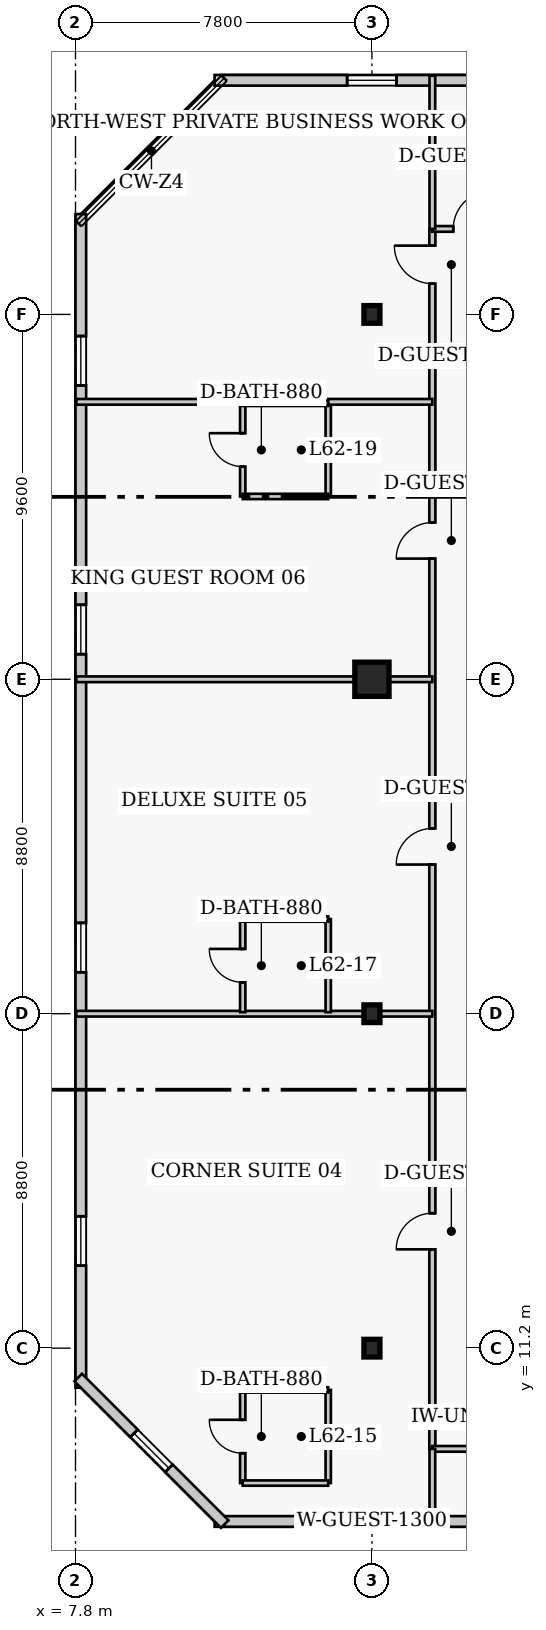
"""IFC4 building model, lengths in metres.
Left out: names, types, materials, properties, quantities, classifications, styles, units other than length and angle.
Written with IfcOpenShell. Run it as: python <this file> out.ifc"""

import sys

from ifc_helpers import new_model, si_unit, direction, frame, frame_2d, origin, origin_2d, place, context, subcontext, project, spatial, rectangle, i_section, extrude, element, fill, save


model = new_model("IFC4")
c1 = context("Model", 3, precision=1e-05, world=origin(), true_north=direction((0.0, 1.0)))
c2 = subcontext(c1, "Body", "Model", "MODEL_VIEW")
j1 = project(units=[si_unit("LENGTHUNIT", "METRE"), si_unit("PLANEANGLEUNIT", "RADIAN")], contexts=[c1])
p1 = place(None, origin())
s1 = spatial("IfcSite", under=j1, at=p1, CompositionType="ELEMENT")
p2 = place(p1, origin())
s2 = spatial("IfcBuilding", under=s1, at=p2, CompositionType="ELEMENT")
p3 = place(p2, frame((0.0, 0.0, 249.4)))
s3 = spatial("IfcBuildingStorey", under=s2, at=p3, CompositionType="ELEMENT", Elevation=249.4)
for number, where, z_axis, x_axis in (
    (1, (15.6, 11.2, 0.0), (0.0, 0.0, 1.0), (1.0, 0.0, 0.0)),
    (2, (15.6, 20.0, 0.0), (0.0, 0.0, 1.0), (1.0, 0.0, 0.0)),
):
    element("IfcColumn", number, at=place(p3, frame(where, z_axis=z_axis, x_axis=x_axis)), inside=s3, PredefinedType="COLUMN", context=c2, shape_type="SweptSolid", body=[
        extrude(i_section(OverallWidth=0.422, OverallDepth=0.465, WebThickness=0.045, FlangeThickness=0.073, FilletRadius=0.017, at=origin_2d()), origin(), (0.0, 0.0, 1.0), 4.0),
    ])
p4 = place(p3, frame((15.6, 28.8, 0.0), z_axis=(0.0, 0.0, 1.0), x_axis=(1.0, 0.0, 0.0)))
e3 = element("IfcColumn", 3, at=p4, inside=s3, PredefinedType="COLUMN", context=c2, shape_type="SweptSolid", body=[
    extrude(rectangle(XDim=0.9, YDim=0.9, at=origin_2d()), origin(), (0.0, 0.0, 1.0), 4.0),
])
p5 = place(p3, frame((15.6, 38.4, 0.0), z_axis=(0.0, 0.0, 1.0), x_axis=(1.0, 0.0, 0.0)))
e4 = element("IfcColumn", 4, at=p5, inside=s3, PredefinedType="COLUMN", context=c2, shape_type="SweptSolid", body=[
    extrude(i_section(OverallWidth=0.422, OverallDepth=0.465, WebThickness=0.045, FlangeThickness=0.073, FilletRadius=0.017, at=origin_2d()), origin(), (0.0, 0.0, 1.0), 4.0),
])
p6 = place(p3, frame((11.46, 6.64, 0.0), z_axis=(0.0, 0.0, 1.0), x_axis=(1.0, 0.0, 0.0)))
e5 = element("IfcWall", 5, at=p6, inside=s3, PredefinedType="SOLIDWALL", context=c2, shape_type="SweptSolid", body=[
    extrude(rectangle(XDim=24.83, YDim=0.28, at=frame_2d((12.415, 0.0))), origin(), (0.0, 0.0, 1.0), 3.76),
])
p7 = place(p6, frame((3.488, 0.0, 0.85)))
e6 = element("IfcOpeningElement", 6, at=p7, cuts=e5, PredefinedType="OPENING", context=c2, shape_type="SweptSolid", body=[
    extrude(rectangle(XDim=1.3, YDim=1.7, at=frame_2d((0.65, 0.85))), frame((0.0, 0.15, 0.0), z_axis=(0.0, -1.0, 0.0), x_axis=(1.0, 0.0, 0.0)), (0.0, 0.0, 1.0), 0.3),
])
p8 = place(p6, frame((12.915, 0.0, 0.85)))
e7 = element("IfcOpeningElement", 7, at=p8, cuts=e5, PredefinedType="OPENING", context=c2, shape_type="SweptSolid", body=[
    extrude(rectangle(XDim=1.3, YDim=1.7, at=frame_2d((0.65, 0.85))), frame((0.0, 0.15, 0.0), z_axis=(0.0, -1.0, 0.0), x_axis=(1.0, 0.0, 0.0)), (0.0, 0.0, 1.0), 0.3),
])
p9 = place(p6, frame((20.692, 0.0, 0.85)))
e8 = element("IfcOpeningElement", 8, at=p9, cuts=e5, PredefinedType="OPENING", context=c2, shape_type="SweptSolid", body=[
    extrude(rectangle(XDim=1.3, YDim=1.7, at=frame_2d((0.65, 0.85))), frame((0.0, 0.15, 0.0), z_axis=(0.0, -1.0, 0.0), x_axis=(1.0, 0.0, 0.0)), (0.0, 0.0, 1.0), 0.3),
])
p10 = place(p3, frame((36.29, 44.56, 0.0), z_axis=(0.0, 0.0, 1.0), x_axis=(-1.0, 0.0, 0.0)))
e9 = element("IfcWall", 9, at=p10, inside=s3, PredefinedType="SOLIDWALL", context=c2, shape_type="SweptSolid", body=[
    extrude(rectangle(XDim=24.83, YDim=0.28, at=frame_2d((12.415, 0.0))), origin(), (0.0, 0.0, 1.0), 3.76),
])
p11 = place(p10, frame((3.488, 0.0, 0.85)))
e10 = element("IfcOpeningElement", 10, at=p11, cuts=e9, PredefinedType="OPENING", context=c2, shape_type="SweptSolid", body=[
    extrude(rectangle(XDim=1.3, YDim=1.7, at=frame_2d((0.65, 0.85))), frame((0.0, 0.15, 0.0), z_axis=(0.0, -1.0, 0.0), x_axis=(1.0, 0.0, 0.0)), (0.0, 0.0, 1.0), 0.3),
])
p12 = place(p10, frame((11.765, 0.0, 0.85)))
e11 = element("IfcOpeningElement", 11, at=p12, cuts=e9, PredefinedType="OPENING", context=c2, shape_type="SweptSolid", body=[
    extrude(rectangle(XDim=1.3, YDim=1.7, at=frame_2d((0.65, 0.85))), frame((0.0, 0.15, 0.0), z_axis=(0.0, -1.0, 0.0), x_axis=(1.0, 0.0, 0.0)), (0.0, 0.0, 1.0), 0.3),
])
p13 = place(p10, frame((20.042, 0.0, 0.85)))
e12 = element("IfcOpeningElement", 12, at=p13, cuts=e9, PredefinedType="OPENING", context=c2, shape_type="SweptSolid", body=[
    extrude(rectangle(XDim=1.3, YDim=1.7, at=frame_2d((0.65, 0.85))), frame((0.0, 0.15, 0.0), z_axis=(0.0, -1.0, 0.0), x_axis=(1.0, 0.0, 0.0)), (0.0, 0.0, 1.0), 0.3),
])
p14 = place(p3, frame((7.94, 41.04, 0.0), z_axis=(0.0, 0.0, 1.0), x_axis=(0.0, -1.0, 0.0)))
e13 = element("IfcWall", 13, at=p14, inside=s3, PredefinedType="SOLIDWALL", context=c2, shape_type="SweptSolid", body=[
    extrude(rectangle(XDim=30.88, YDim=0.28, at=frame_2d((15.44, 0.0))), origin(), (0.0, 0.0, 1.0), 3.76),
])
p15 = place(p14, frame((3.21, 0.0, 0.85)))
e14 = element("IfcOpeningElement", 14, at=p15, cuts=e13, PredefinedType="OPENING", context=c2, shape_type="SweptSolid", body=[
    extrude(rectangle(XDim=1.3, YDim=1.7, at=frame_2d((0.65, 0.85))), frame((0.0, 0.15, 0.0), z_axis=(0.0, -1.0, 0.0), x_axis=(1.0, 0.0, 0.0)), (0.0, 0.0, 1.0), 0.3),
])
p16 = place(p14, frame((10.28, 0.0, 0.85)))
e15 = element("IfcOpeningElement", 15, at=p16, cuts=e13, PredefinedType="OPENING", context=c2, shape_type="SweptSolid", body=[
    extrude(rectangle(XDim=1.3, YDim=1.7, at=frame_2d((0.65, 0.85))), frame((0.0, 0.15, 0.0), z_axis=(0.0, -1.0, 0.0), x_axis=(1.0, 0.0, 0.0)), (0.0, 0.0, 1.0), 0.3),
])
p17 = place(p14, frame((18.65, 0.0, 0.85)))
e16 = element("IfcOpeningElement", 16, at=p17, cuts=e13, PredefinedType="OPENING", context=c2, shape_type="SweptSolid", body=[
    extrude(rectangle(XDim=1.3, YDim=1.7, at=frame_2d((0.65, 0.85))), frame((0.0, 0.15, 0.0), z_axis=(0.0, -1.0, 0.0), x_axis=(1.0, 0.0, 0.0)), (0.0, 0.0, 1.0), 0.3),
])
p18 = place(p14, frame((26.37, 0.0, 0.85)))
e17 = element("IfcOpeningElement", 17, at=p18, cuts=e13, PredefinedType="OPENING", context=c2, shape_type="SweptSolid", body=[
    extrude(rectangle(XDim=1.3, YDim=1.7, at=frame_2d((0.65, 0.85))), frame((0.0, 0.15, 0.0), z_axis=(0.0, -1.0, 0.0), x_axis=(1.0, 0.0, 0.0)), (0.0, 0.0, 1.0), 0.3),
])
p19 = place(p3, frame((7.871, 10.427, 0.0), z_axis=(0.0, 0.0, 1.0), x_axis=(0.707129162587, -0.707084399077, 0.0)))
e18 = element("IfcWall", 18, at=p19, inside=s3, PredefinedType="SOLIDWALL", context=c2, shape_type="SweptSolid", body=[
    extrude(rectangle(XDim=5.454, YDim=0.28, at=frame_2d((2.727, 0.0))), origin(), (0.0, 0.0, 1.0), 3.76),
])
p20 = place(p19, frame((2.077, 0.0, 0.85)))
e19 = element("IfcOpeningElement", 19, at=p20, cuts=e18, PredefinedType="OPENING", context=c2, shape_type="SweptSolid", body=[
    extrude(rectangle(XDim=1.3, YDim=1.7, at=frame_2d((0.65, 0.85))), frame((0.0, 0.15, 0.0), z_axis=(0.0, -1.0, 0.0), x_axis=(1.0, 0.0, 0.0)), (0.0, 0.0, 1.0), 0.3),
])
p21 = place(p3, frame((17.19, 8.55, 0.0), z_axis=(0.0, 0.0, 1.0), x_axis=(0.0, 1.0, 0.0)))
e20 = element("IfcWall", 20, at=p21, inside=s3, PredefinedType="PARTITIONING", context=c2, shape_type="SweptSolid", body=[
    extrude(rectangle(XDim=32.1, YDim=0.16, at=frame_2d((16.05, 0.0))), origin(), (0.0, 0.0, 1.0), 3.76),
])
p22 = place(p21, frame((5.25, 0.0, 0.0)))
e21 = element("IfcOpeningElement", 21, at=p22, cuts=e20, PredefinedType="OPENING", context=c2, shape_type="SweptSolid", body=[
    extrude(rectangle(XDim=0.95, YDim=2.1, at=frame_2d((0.475, 1.05))), frame((0.0, 0.09, 0.0), z_axis=(0.0, -1.0, 0.0), x_axis=(1.0, 0.0, 0.0)), (0.0, 0.0, 1.0), 0.18),
])
p23 = place(p21, frame((15.375, 0.0, 0.0)))
e22 = element("IfcOpeningElement", 22, at=p23, cuts=e20, PredefinedType="OPENING", context=c2, shape_type="SweptSolid", body=[
    extrude(rectangle(XDim=0.95, YDim=2.1, at=frame_2d((0.475, 1.05))), frame((0.0, 0.09, 0.0), z_axis=(0.0, -1.0, 0.0), x_axis=(1.0, 0.0, 0.0)), (0.0, 0.0, 1.0), 0.18),
])
p24 = place(p21, frame((23.425, 0.0, 0.0)))
e23 = element("IfcOpeningElement", 23, at=p24, cuts=e20, PredefinedType="OPENING", context=c2, shape_type="SweptSolid", body=[
    extrude(rectangle(XDim=0.95, YDim=2.1, at=frame_2d((0.475, 1.05))), frame((0.0, 0.09, 0.0), z_axis=(0.0, -1.0, 0.0), x_axis=(1.0, 0.0, 0.0)), (0.0, 0.0, 1.0), 0.18),
])
p25 = place(p21, frame((30.66, 0.0, 0.0)))
e24 = element("IfcOpeningElement", 24, at=p25, cuts=e20, PredefinedType="OPENING", context=c2, shape_type="SweptSolid", body=[
    extrude(rectangle(XDim=1.0, YDim=2.15, at=frame_2d((0.5, 1.075))), frame((0.0, 0.09, 0.0), z_axis=(0.0, -1.0, 0.0), x_axis=(1.0, 0.0, 0.0)), (0.0, 0.0, 1.0), 0.18),
])
p26 = place(p3, frame((17.19, 8.55, 0.0), z_axis=(0.0, 0.0, 1.0), x_axis=(1.0, 0.0, 0.0)))
e25 = element("IfcWall", 25, at=p26, inside=s3, PredefinedType="PARTITIONING", context=c2, shape_type="SweptSolid", body=[
    extrude(rectangle(XDim=2.22, YDim=0.15, at=frame_2d((1.11, 0.0))), origin(), (0.0, 0.0, 1.0), 3.76),
])
p27 = place(p3, frame((17.19, 40.65, 0.0), z_axis=(0.0, 0.0, 1.0), x_axis=(1.0, 0.0, 0.0)))
e26 = element("IfcWall", 26, at=p27, inside=s3, PredefinedType="PARTITIONING", context=c2, shape_type="SweptSolid", body=[
    extrude(rectangle(XDim=4.91, YDim=0.15, at=frame_2d((2.455, 0.0))), origin(), (0.0, 0.0, 1.0), 3.76),
])
p28 = place(p27, frame((0.55, 0.0, 0.0)))
e27 = element("IfcOpeningElement", 27, at=p28, cuts=e26, PredefinedType="OPENING", context=c2, shape_type="SweptSolid", body=[
    extrude(rectangle(XDim=1.0, YDim=2.15, at=frame_2d((0.5, 1.075))), frame((0.0, 0.085, 0.0), z_axis=(0.0, -1.0, 0.0), x_axis=(1.0, 0.0, 0.0)), (0.0, 0.0, 1.0), 0.17),
])
p29 = place(p3, frame((17.19, 40.65, 0.0), z_axis=(0.0, 0.0, 1.0), x_axis=(0.0, 1.0, 0.0)))
e28 = element("IfcWall", 28, at=p29, inside=s3, PredefinedType="PARTITIONING", context=c2, shape_type="SweptSolid", body=[
    extrude(rectangle(XDim=4.03, YDim=0.15, at=frame_2d((2.015, 0.0))), origin(), (0.0, 0.0, 1.0), 3.76),
])
p30 = place(p3, frame((17.19, 6.52, 0.0), z_axis=(0.0, 0.0, 1.0), x_axis=(0.0, 1.0, 0.0)))
e29 = element("IfcWall", 29, at=p30, inside=s3, PredefinedType="PARTITIONING", context=c2, shape_type="SweptSolid", body=[
    extrude(rectangle(XDim=2.03, YDim=0.15, at=frame_2d((1.015, 0.0))), origin(), (0.0, 0.0, 1.0), 3.76),
])
p31 = place(p3, frame((12.2, 7.65, 0.0), z_axis=(0.0, 0.0, 1.0), x_axis=(0.0, 1.0, 0.0)))
e30 = element("IfcWall", 30, at=p31, inside=s3, PredefinedType="PLUMBINGWALL", context=c2, shape_type="SweptSolid", body=[
    extrude(rectangle(XDim=2.45, YDim=0.14, at=frame_2d((1.225, 0.0))), origin(), (0.0, 0.0, 1.0), 3.76),
])
p32 = place(p31, frame((0.785, 0.0, 0.0)))
e31 = element("IfcOpeningElement", 31, at=p32, cuts=e30, PredefinedType="OPENING", context=c2, shape_type="SweptSolid", body=[
    extrude(rectangle(XDim=0.88, YDim=2.05, at=frame_2d((0.44, 1.025))), frame((0.0, 0.08, 0.0), z_axis=(0.0, -1.0, 0.0), x_axis=(1.0, 0.0, 0.0)), (0.0, 0.0, 1.0), 0.16),
])
p33 = place(p3, frame((14.45, 7.65, 0.0), z_axis=(0.0, 0.0, 1.0), x_axis=(0.0, 1.0, 0.0)))
e32 = element("IfcWall", 32, at=p33, inside=s3, PredefinedType="PLUMBINGWALL", context=c2, shape_type="SweptSolid", body=[
    extrude(rectangle(XDim=2.45, YDim=0.14, at=frame_2d((1.225, 0.0))), origin(), (0.0, 0.0, 1.0), 3.76),
])
for number, where, z_axis, x_axis in (
    (33, (12.2, 7.65, 0.0), (0.0, 0.0, 1.0), (1.0, 0.0, 0.0)),
    (34, (12.2, 10.1, 0.0), (0.0, 0.0, 1.0), (1.0, 0.0, 0.0)),
):
    element("IfcWall", number, at=place(p3, frame(where, z_axis=z_axis, x_axis=x_axis)), inside=s3, PredefinedType="PLUMBINGWALL", context=c2, shape_type="SweptSolid", body=[
        extrude(rectangle(XDim=2.25, YDim=0.14, at=frame_2d((1.125, 0.0))), origin(), (0.0, 0.0, 1.0), 3.76),
    ])
p34 = place(p3, frame((7.82, 20.0, 0.0), z_axis=(0.0, 0.0, 1.0), x_axis=(1.0, 0.0, 0.0)))
e35 = element("IfcWall", 35, at=p34, inside=s3, PredefinedType="PARTITIONING", context=c2, shape_type="SweptSolid", body=[
    extrude(rectangle(XDim=9.37, YDim=0.15, at=frame_2d((4.685, 0.0))), origin(), (0.0, 0.0, 1.0), 3.064),
])
p35 = place(p3, frame((12.2, 20.04, 0.0), z_axis=(0.0, 0.0, 1.0), x_axis=(0.0, 1.0, 0.0)))
e36 = element("IfcWall", 36, at=p35, inside=s3, PredefinedType="PLUMBINGWALL", context=c2, shape_type="SweptSolid", body=[
    extrude(rectangle(XDim=2.45, YDim=0.14, at=frame_2d((1.225, 0.0))), origin(), (0.0, 0.0, 1.0), 3.76),
])
p36 = place(p35, frame((0.785, 0.0, 0.0)))
e37 = element("IfcOpeningElement", 37, at=p36, cuts=e36, PredefinedType="OPENING", context=c2, shape_type="SweptSolid", body=[
    extrude(rectangle(XDim=0.88, YDim=2.05, at=frame_2d((0.44, 1.025))), frame((0.0, 0.08, 0.0), z_axis=(0.0, -1.0, 0.0), x_axis=(1.0, 0.0, 0.0)), (0.0, 0.0, 1.0), 0.16),
])
p37 = place(p3, frame((14.45, 20.04, 0.0), z_axis=(0.0, 0.0, 1.0), x_axis=(0.0, 1.0, 0.0)))
e38 = element("IfcWall", 38, at=p37, inside=s3, PredefinedType="PLUMBINGWALL", context=c2, shape_type="SweptSolid", body=[
    extrude(rectangle(XDim=2.45, YDim=0.14, at=frame_2d((1.225, 0.0))), origin(), (0.0, 0.0, 1.0), 3.76),
])
p38 = place(p3, frame((12.2, 22.49, 0.0), z_axis=(0.0, 0.0, 1.0), x_axis=(1.0, 0.0, 0.0)))
e39 = element("IfcWall", 39, at=p38, inside=s3, PredefinedType="PLUMBINGWALL", context=c2, shape_type="SweptSolid", body=[
    extrude(rectangle(XDim=2.25, YDim=0.14, at=frame_2d((1.125, 0.0))), origin(), (0.0, 0.0, 1.0), 3.76),
])
p39 = place(p3, frame((7.82, 28.8, 0.0), z_axis=(0.0, 0.0, 1.0), x_axis=(1.0, 0.0, 0.0)))
e40 = element("IfcWall", 40, at=p39, inside=s3, PredefinedType="PARTITIONING", context=c2, shape_type="SweptSolid", body=[
    extrude(rectangle(XDim=9.37, YDim=0.15, at=frame_2d((4.685, 0.0))), origin(), (0.0, 0.0, 1.0), 3.064),
])
p40 = place(p3, frame((12.2, 33.61, 0.0), z_axis=(0.0, 0.0, 1.0), x_axis=(0.0, 1.0, 0.0)))
e41 = element("IfcWall", 41, at=p40, inside=s3, PredefinedType="PLUMBINGWALL", context=c2, shape_type="SweptSolid", body=[
    extrude(rectangle(XDim=2.45, YDim=0.14, at=frame_2d((1.225, 0.0))), origin(), (0.0, 0.0, 1.0), 3.76),
])
p41 = place(p40, frame((0.785, 0.0, 0.0)))
e42 = element("IfcOpeningElement", 42, at=p41, cuts=e41, PredefinedType="OPENING", context=c2, shape_type="SweptSolid", body=[
    extrude(rectangle(XDim=0.88, YDim=2.05, at=frame_2d((0.44, 1.025))), frame((0.0, 0.08, 0.0), z_axis=(0.0, -1.0, 0.0), x_axis=(1.0, 0.0, 0.0)), (0.0, 0.0, 1.0), 0.16),
])
p42 = place(p3, frame((14.45, 33.61, 0.0), z_axis=(0.0, 0.0, 1.0), x_axis=(0.0, 1.0, 0.0)))
e43 = element("IfcWall", 43, at=p42, inside=s3, PredefinedType="PLUMBINGWALL", context=c2, shape_type="SweptSolid", body=[
    extrude(rectangle(XDim=2.45, YDim=0.14, at=frame_2d((1.225, 0.0))), origin(), (0.0, 0.0, 1.0), 3.76),
])
for number, where, z_axis, x_axis in (
    (44, (12.2, 33.61, 0.0), (0.0, 0.0, 1.0), (1.0, 0.0, 0.0)),
    (45, (12.2, 36.06, 0.0), (0.0, 0.0, 1.0), (1.0, 0.0, 0.0)),
):
    element("IfcWall", number, at=place(p3, frame(where, z_axis=z_axis, x_axis=x_axis)), inside=s3, PredefinedType="PLUMBINGWALL", context=c2, shape_type="SweptSolid", body=[
        extrude(rectangle(XDim=2.25, YDim=0.14, at=frame_2d((1.125, 0.0))), origin(), (0.0, 0.0, 1.0), 3.76),
    ])
p43 = place(p3, frame((7.82, 36.1, 0.0), z_axis=(0.0, 0.0, 1.0), x_axis=(1.0, 0.0, 0.0)))
e46 = element("IfcWall", 46, at=p43, inside=s3, PredefinedType="PARTITIONING", context=c2, shape_type="SweptSolid", body=[
    extrude(rectangle(XDim=4.38, YDim=0.15, at=frame_2d((2.19, 0.0))), origin(), (0.0, 0.0, 1.0), 3.76),
])
p44 = place(p3, frame((14.45, 36.1, 0.0), z_axis=(0.0, 0.0, 1.0), x_axis=(1.0, 0.0, 0.0)))
e47 = element("IfcWall", 47, at=p44, inside=s3, PredefinedType="PARTITIONING", context=c2, shape_type="SweptSolid", body=[
    extrude(rectangle(XDim=2.74, YDim=0.15, at=frame_2d((1.37, 0.0))), origin(), (0.0, 0.0, 1.0), 3.76),
])
p45 = place(p7, origin())
e48 = element("IfcWindow", 48, at=p45, inside=s3, PartitioningType="SINGLE_PANEL", PredefinedType="WINDOW", context=c2, shape_type="SweptSolid", body=[
    extrude(rectangle(XDim=1.3, YDim=1.7, at=frame_2d((0.65, 0.85))), frame((0.0, 0.03, 0.0), z_axis=(0.0, -1.0, 0.0), x_axis=(1.0, 0.0, 0.0)), (0.0, 0.0, 1.0), 0.06),
])
fill(e6, e48)
p46 = place(p13, origin())
e49 = element("IfcWindow", 49, at=p46, inside=s3, PartitioningType="SINGLE_PANEL", PredefinedType="WINDOW", context=c2, shape_type="SweptSolid", body=[
    extrude(rectangle(XDim=1.3, YDim=1.7, at=frame_2d((0.65, 0.85))), frame((0.0, 0.03, 0.0), z_axis=(0.0, -1.0, 0.0), x_axis=(1.0, 0.0, 0.0)), (0.0, 0.0, 1.0), 0.06),
])
fill(e12, e49)
p47 = place(p15, origin())
e50 = element("IfcWindow", 50, at=p47, inside=s3, PartitioningType="SINGLE_PANEL", PredefinedType="WINDOW", context=c2, shape_type="SweptSolid", body=[
    extrude(rectangle(XDim=1.3, YDim=1.7, at=frame_2d((0.65, 0.85))), frame((0.0, 0.03, 0.0), z_axis=(0.0, -1.0, 0.0), x_axis=(1.0, 0.0, 0.0)), (0.0, 0.0, 1.0), 0.06),
])
fill(e14, e50)
p48 = place(p16, origin())
e51 = element("IfcWindow", 51, at=p48, inside=s3, PartitioningType="SINGLE_PANEL", PredefinedType="WINDOW", context=c2, shape_type="SweptSolid", body=[
    extrude(rectangle(XDim=1.3, YDim=1.7, at=frame_2d((0.65, 0.85))), frame((0.0, 0.03, 0.0), z_axis=(0.0, -1.0, 0.0), x_axis=(1.0, 0.0, 0.0)), (0.0, 0.0, 1.0), 0.06),
])
fill(e15, e51)
p49 = place(p17, origin())
e52 = element("IfcWindow", 52, at=p49, inside=s3, PartitioningType="SINGLE_PANEL", PredefinedType="WINDOW", context=c2, shape_type="SweptSolid", body=[
    extrude(rectangle(XDim=1.3, YDim=1.7, at=frame_2d((0.65, 0.85))), frame((0.0, 0.03, 0.0), z_axis=(0.0, -1.0, 0.0), x_axis=(1.0, 0.0, 0.0)), (0.0, 0.0, 1.0), 0.06),
])
fill(e16, e52)
p50 = place(p18, origin())
e53 = element("IfcWindow", 53, at=p50, inside=s3, PartitioningType="SINGLE_PANEL", PredefinedType="WINDOW", context=c2, shape_type="SweptSolid", body=[
    extrude(rectangle(XDim=1.3, YDim=1.7, at=frame_2d((0.65, 0.85))), frame((0.0, 0.03, 0.0), z_axis=(0.0, -1.0, 0.0), x_axis=(1.0, 0.0, 0.0)), (0.0, 0.0, 1.0), 0.06),
])
fill(e17, e53)
p51 = place(p20, origin())
e54 = element("IfcWindow", 54, at=p51, inside=s3, PartitioningType="SINGLE_PANEL", PredefinedType="WINDOW", context=c2, shape_type="SweptSolid", body=[
    extrude(rectangle(XDim=1.3, YDim=1.7, at=frame_2d((0.65, 0.85))), frame((0.0, 0.03, 0.0), z_axis=(0.0, -1.0, 0.0), x_axis=(1.0, 0.0, 0.0)), (0.0, 0.0, 1.0), 0.06),
])
fill(e19, e54)
p52 = place(p28, origin())
e55 = element("IfcDoor", 55, at=p52, inside=s3, OperationType="SINGLE_SWING_RIGHT", PredefinedType="DOOR", context=c2, shape_type="SweptSolid", body=[
    extrude(rectangle(XDim=1.0, YDim=2.15, at=frame_2d((0.5, 1.075))), frame((0.0, 0.025, 0.0), z_axis=(0.0, -1.0, 0.0), x_axis=(1.0, 0.0, 0.0)), (0.0, 0.0, 1.0), 0.05),
])
fill(e27, e55)
p53 = place(p32, origin())
e56 = element("IfcDoor", 56, at=p53, inside=s3, OperationType="SINGLE_SWING_RIGHT", PredefinedType="DOOR", context=c2, shape_type="SweptSolid", body=[
    extrude(rectangle(XDim=0.88, YDim=2.05, at=frame_2d((0.44, 1.025))), frame((0.0, 0.025, 0.0), z_axis=(0.0, -1.0, 0.0), x_axis=(1.0, 0.0, 0.0)), (0.0, 0.0, 1.0), 0.05),
])
fill(e31, e56)
p54 = place(p22, origin())
e57 = element("IfcDoor", 57, at=p54, inside=s3, OperationType="SINGLE_SWING_LEFT", PredefinedType="DOOR", context=c2, shape_type="SweptSolid", body=[
    extrude(rectangle(XDim=0.95, YDim=2.1, at=frame_2d((0.475, 1.05))), frame((0.0, 0.025, 0.0), z_axis=(0.0, -1.0, 0.0), x_axis=(1.0, 0.0, 0.0)), (0.0, 0.0, 1.0), 0.05),
])
fill(e21, e57)
p55 = place(p36, origin())
e58 = element("IfcDoor", 58, at=p55, inside=s3, OperationType="SINGLE_SWING_RIGHT", PredefinedType="DOOR", context=c2, shape_type="SweptSolid", body=[
    extrude(rectangle(XDim=0.88, YDim=2.05, at=frame_2d((0.44, 1.025))), frame((0.0, 0.025, 0.0), z_axis=(0.0, -1.0, 0.0), x_axis=(1.0, 0.0, 0.0)), (0.0, 0.0, 1.0), 0.05),
])
fill(e37, e58)
p56 = place(p23, origin())
e59 = element("IfcDoor", 59, at=p56, inside=s3, OperationType="SINGLE_SWING_LEFT", PredefinedType="DOOR", context=c2, shape_type="SweptSolid", body=[
    extrude(rectangle(XDim=0.95, YDim=2.1, at=frame_2d((0.475, 1.05))), frame((0.0, 0.025, 0.0), z_axis=(0.0, -1.0, 0.0), x_axis=(1.0, 0.0, 0.0)), (0.0, 0.0, 1.0), 0.05),
])
fill(e22, e59)
p57 = place(p41, origin())
e60 = element("IfcDoor", 60, at=p57, inside=s3, OperationType="SINGLE_SWING_RIGHT", PredefinedType="DOOR", context=c2, shape_type="SweptSolid", body=[
    extrude(rectangle(XDim=0.88, YDim=2.05, at=frame_2d((0.44, 1.025))), frame((0.0, 0.025, 0.0), z_axis=(0.0, -1.0, 0.0), x_axis=(1.0, 0.0, 0.0)), (0.0, 0.0, 1.0), 0.05),
])
fill(e42, e60)
p58 = place(p24, origin())
e61 = element("IfcDoor", 61, at=p58, inside=s3, OperationType="SINGLE_SWING_LEFT", PredefinedType="DOOR", context=c2, shape_type="SweptSolid", body=[
    extrude(rectangle(XDim=0.95, YDim=2.1, at=frame_2d((0.475, 1.05))), frame((0.0, 0.025, 0.0), z_axis=(0.0, -1.0, 0.0), x_axis=(1.0, 0.0, 0.0)), (0.0, 0.0, 1.0), 0.05),
])
fill(e23, e61)
p59 = place(p25, origin())
e62 = element("IfcDoor", 62, at=p59, inside=s3, OperationType="SINGLE_SWING_RIGHT", PredefinedType="DOOR", context=c2, shape_type="SweptSolid", body=[
    extrude(rectangle(XDim=1.0, YDim=2.15, at=frame_2d((0.5, 1.075))), frame((0.0, 0.025, 0.0), z_axis=(0.0, -1.0, 0.0), x_axis=(1.0, 0.0, 0.0)), (0.0, 0.0, 1.0), 0.05),
])
fill(e24, e62)
save(model, sys.argv[1])
